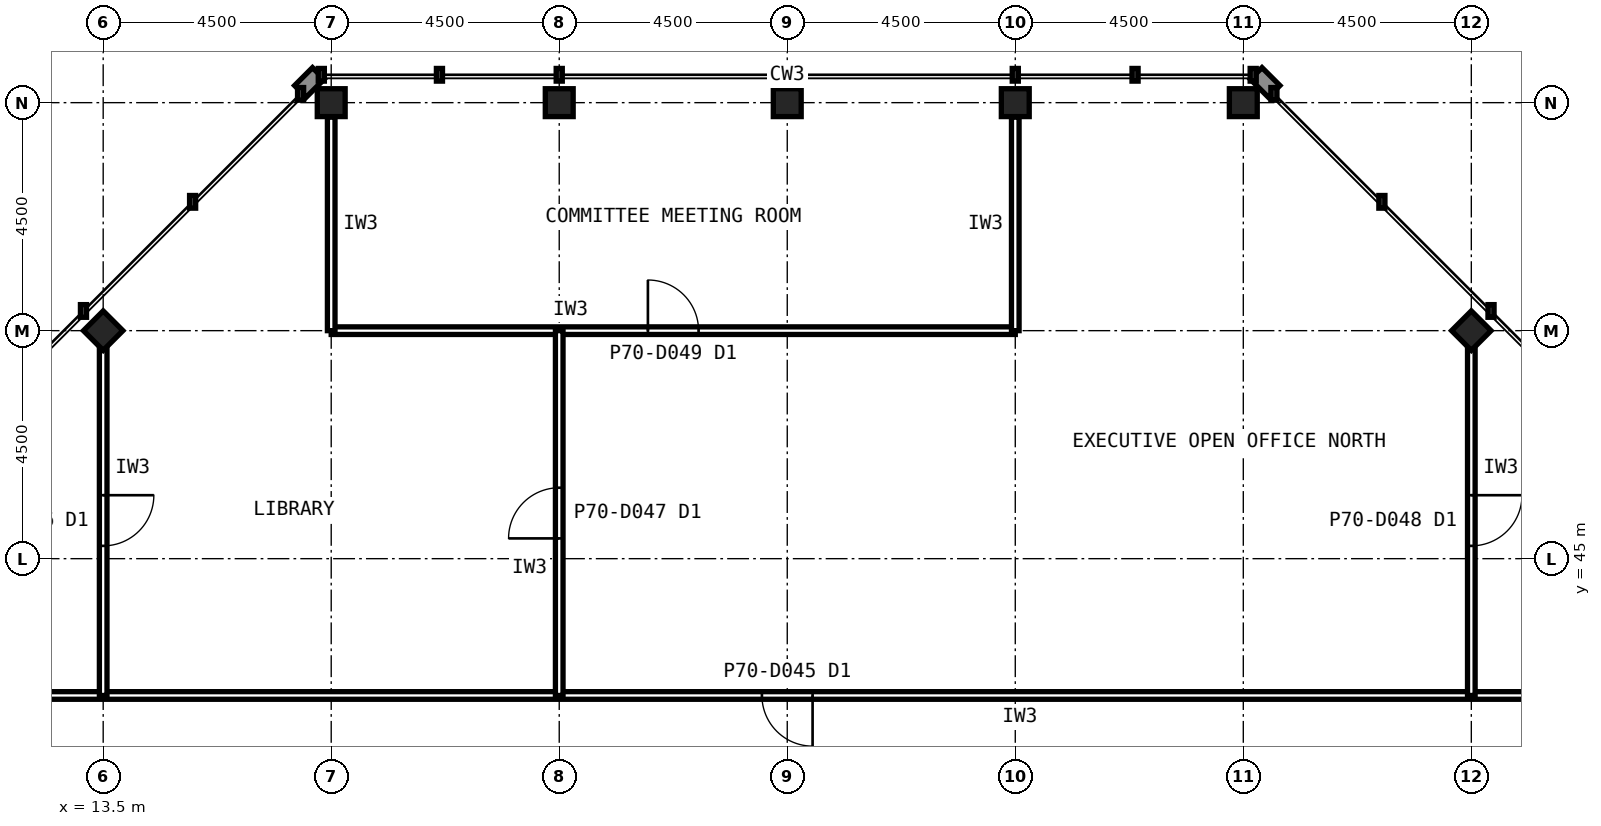
"""IFC4 building model, lengths in metres.
Left out: names, types, materials, properties, quantities, classifications, styles, units other than length and angle.
Written with IfcOpenShell. Run it as: python <this file> out.ifc"""

import sys

from ifc_helpers import new_model, si_unit, direction, frame, frame_2d, origin, origin_2d, place, context, subcontext, project, spatial, rectangle, hollow_rectangle, extrude, element, fill, save


model = new_model("IFC4")
c1 = context("Model", 3, precision=1e-05, world=origin(), true_north=direction((0.0, 1.0)))
c2 = subcontext(c1, "Body", "Model", "MODEL_VIEW")
j1 = project(units=[si_unit("LENGTHUNIT", "METRE"), si_unit("PLANEANGLEUNIT", "RADIAN")], contexts=[c1])
p1 = place(None, origin())
s1 = spatial("IfcSite", under=j1, at=p1, CompositionType="ELEMENT")
p2 = place(p1, origin())
s2 = spatial("IfcBuilding", under=s1, at=p2, CompositionType="ELEMENT")
p3 = place(p2, frame((0.0, 0.0, 294.6)))
s3 = spatial("IfcBuildingStorey", under=s2, at=p3, CompositionType="ELEMENT", Elevation=294.6)
for number, where, z_axis, x_axis in (
    (1, (36.0, 54.0, 0.0), (0.0, 0.0, 1.0), (1.0, 0.0, 0.0)),
    (2, (31.5, 54.0, 0.0), (0.0, 0.0, 1.0), (1.0, 0.0, 0.0)),
    (3, (27.0, 54.0, 0.0), (0.0, 0.0, 1.0), (1.0, 0.0, 0.0)),
    (4, (22.5, 54.0, 0.0), (0.0, 0.0, 1.0), (1.0, 0.0, 0.0)),
    (5, (18.0, 54.0, 0.0), (0.0, 0.0, 1.0), (1.0, 0.0, 0.0)),
    (6, (40.5, 49.5, 0.0), (0.0, 0.0, 1.0), (0.707, 0.707, 0.0)),
    (7, (13.5, 49.5, 0.0), (0.0, 0.0, 1.0), (0.707, 0.707, 0.0)),
):
    element("IfcColumn", number, at=place(p3, frame(where, z_axis=z_axis, x_axis=x_axis)), inside=s3, PredefinedType="COLUMN", context=c2, shape_type="SweptSolid", body=[
        extrude(hollow_rectangle(XDim=0.55, YDim=0.55, WallThickness=0.025, at=origin_2d()), origin(), (0.0, 0.0, 1.0), 4.0),
    ])
p4 = place(p3, frame((42.3, 42.3, 0.0), z_axis=(0.0, 0.0, 1.0), x_axis=(-1.0, 0.0, 0.0)))
e8 = element("IfcWall", 8, at=p4, inside=s3, PredefinedType="PARTITIONING", context=c2, shape_type="SweptSolid", body=[
    extrude(rectangle(XDim=30.6, YDim=0.15, at=frame_2d((15.3, 0.0))), origin(), (0.0, 0.0, 1.0), 3.84),
])
p5 = place(p4, frame((14.8, 0.0, 0.0)))
e9 = element("IfcOpeningElement", 9, at=p5, cuts=e8, PredefinedType="OPENING", context=c2, shape_type="SweptSolid", body=[
    extrude(rectangle(XDim=1.0, YDim=2.1, at=frame_2d((0.5, 1.05))), frame((0.0, 0.085, 0.0), z_axis=(0.0, -1.0, 0.0), x_axis=(1.0, 0.0, 0.0)), (0.0, 0.0, 1.0), 0.17),
])
p6 = place(p3, frame((18.0, 49.5, 0.0), z_axis=(0.0, 0.0, 1.0), x_axis=(1.0, 0.0, 0.0)))
e10 = element("IfcWall", 10, at=p6, inside=s3, PredefinedType="PARTITIONING", context=c2, shape_type="SweptSolid", body=[
    extrude(rectangle(XDim=13.5, YDim=0.15, at=frame_2d((6.75, 0.0))), origin(), (0.0, 0.0, 1.0), 3.84),
])
p7 = place(p6, frame((6.25, 0.0, 0.0)))
e11 = element("IfcOpeningElement", 11, at=p7, cuts=e10, PredefinedType="OPENING", context=c2, shape_type="SweptSolid", body=[
    extrude(rectangle(XDim=1.0, YDim=2.1, at=frame_2d((0.5, 1.05))), frame((0.0, 0.085, 0.0), z_axis=(0.0, -1.0, 0.0), x_axis=(1.0, 0.0, 0.0)), (0.0, 0.0, 1.0), 0.17),
])
for number, where, z_axis, x_axis in (
    (12, (31.5, 49.5, 0.0), (0.0, 0.0, 1.0), (0.0, 1.0, 0.0)),
    (13, (18.0, 53.715, 0.0), (0.0, 0.0, 1.0), (0.0, -1.0, 0.0)),
):
    element("IfcWall", number, at=place(p3, frame(where, z_axis=z_axis, x_axis=x_axis)), inside=s3, PredefinedType="PARTITIONING", context=c2, shape_type="SweptSolid", body=[
        extrude(rectangle(XDim=4.215, YDim=0.15, at=frame_2d((2.107, 0.0))), origin(), (0.0, 0.0, 1.0), 2.989),
    ])
p8 = place(p3, frame((22.5, 42.3, 0.0), z_axis=(0.0, 0.0, 1.0), x_axis=(0.0, 1.0, 0.0)))
e14 = element("IfcWall", 14, at=p8, inside=s3, PredefinedType="PARTITIONING", context=c2, shape_type="SweptSolid", body=[
    extrude(rectangle(XDim=7.2, YDim=0.15, at=frame_2d((3.6, 0.0))), origin(), (0.0, 0.0, 1.0), 2.989),
])
p9 = place(p8, frame((3.1, 0.0, 0.0)))
e15 = element("IfcOpeningElement", 15, at=p9, cuts=e14, PredefinedType="OPENING", context=c2, shape_type="SweptSolid", body=[
    extrude(rectangle(XDim=1.0, YDim=2.1, at=frame_2d((0.5, 1.05))), frame((0.0, 0.085, 0.0), z_axis=(0.0, -1.0, 0.0), x_axis=(1.0, 0.0, 0.0)), (0.0, 0.0, 1.0), 0.17),
])
p10 = place(p3, frame((40.5, 49.205, 0.0), z_axis=(0.0, 0.0, 1.0), x_axis=(0.0, -1.0, 0.0)))
e16 = element("IfcWall", 16, at=p10, inside=s3, PredefinedType="PARTITIONING", context=c2, shape_type="SweptSolid", body=[
    extrude(rectangle(XDim=6.905, YDim=0.15, at=frame_2d((3.453, 0.0))), origin(), (0.0, 0.0, 1.0), 2.989),
])
p11 = place(p10, frame((2.952, 0.0, 0.0)))
e17 = element("IfcOpeningElement", 17, at=p11, cuts=e16, PredefinedType="OPENING", context=c2, shape_type="SweptSolid", body=[
    extrude(rectangle(XDim=1.0, YDim=2.1, at=frame_2d((0.5, 1.05))), frame((0.0, 0.085, 0.0), z_axis=(0.0, -1.0, 0.0), x_axis=(1.0, 0.0, 0.0)), (0.0, 0.0, 1.0), 0.17),
])
p12 = place(p3, frame((13.5, 49.205, 0.0), z_axis=(0.0, 0.0, 1.0), x_axis=(0.0, -1.0, 0.0)))
e18 = element("IfcWall", 18, at=p12, inside=s3, PredefinedType="PARTITIONING", context=c2, shape_type="SweptSolid", body=[
    extrude(rectangle(XDim=6.905, YDim=0.15, at=frame_2d((3.453, 0.0))), origin(), (0.0, 0.0, 1.0), 2.989),
])
p13 = place(p12, frame((2.952, 0.0, 0.0)))
e19 = element("IfcOpeningElement", 19, at=p13, cuts=e18, PredefinedType="OPENING", context=c2, shape_type="SweptSolid", body=[
    extrude(rectangle(XDim=1.0, YDim=2.1, at=frame_2d((0.5, 1.05))), frame((0.0, 0.085, 0.0), z_axis=(0.0, -1.0, 0.0), x_axis=(1.0, 0.0, 0.0)), (0.0, 0.0, 1.0), 0.17),
])
p14 = place(p5, origin())
e20 = element("IfcDoor", 20, at=p14, inside=s3, OperationType="SINGLE_SWING_LEFT", PredefinedType="DOOR", context=c2, shape_type="SweptSolid", body=[
    extrude(rectangle(XDim=1.0, YDim=2.1, at=frame_2d((0.5, 1.05))), frame((0.0, 0.025, 0.0), z_axis=(0.0, -1.0, 0.0), x_axis=(1.0, 0.0, 0.0)), (0.0, 0.0, 1.0), 0.05),
])
fill(e9, e20)
p15 = place(p7, origin())
e21 = element("IfcDoor", 21, at=p15, inside=s3, OperationType="SINGLE_SWING_LEFT", PredefinedType="DOOR", context=c2, shape_type="SweptSolid", body=[
    extrude(rectangle(XDim=1.0, YDim=2.1, at=frame_2d((0.5, 1.05))), frame((0.0, 0.025, 0.0), z_axis=(0.0, -1.0, 0.0), x_axis=(1.0, 0.0, 0.0)), (0.0, 0.0, 1.0), 0.05),
])
fill(e11, e21)
p16 = place(p9, origin())
e22 = element("IfcDoor", 22, at=p16, inside=s3, OperationType="SINGLE_SWING_LEFT", PredefinedType="DOOR", context=c2, shape_type="SweptSolid", body=[
    extrude(rectangle(XDim=1.0, YDim=2.1, at=frame_2d((0.5, 1.05))), frame((0.0, 0.025, 0.0), z_axis=(0.0, -1.0, 0.0), x_axis=(1.0, 0.0, 0.0)), (0.0, 0.0, 1.0), 0.05),
])
fill(e15, e22)
p17 = place(p11, origin())
e23 = element("IfcDoor", 23, at=p17, inside=s3, OperationType="SINGLE_SWING_LEFT", PredefinedType="DOOR", context=c2, shape_type="SweptSolid", body=[
    extrude(rectangle(XDim=1.0, YDim=2.1, at=frame_2d((0.5, 1.05))), frame((0.0, 0.025, 0.0), z_axis=(0.0, -1.0, 0.0), x_axis=(1.0, 0.0, 0.0)), (0.0, 0.0, 1.0), 0.05),
])
fill(e17, e23)
p18 = place(p13, origin())
e24 = element("IfcDoor", 24, at=p18, inside=s3, OperationType="SINGLE_SWING_LEFT", PredefinedType="DOOR", context=c2, shape_type="SweptSolid", body=[
    extrude(rectangle(XDim=1.0, YDim=2.1, at=frame_2d((0.5, 1.05))), frame((0.0, 0.025, 0.0), z_axis=(0.0, -1.0, 0.0), x_axis=(1.0, 0.0, 0.0)), (0.0, 0.0, 1.0), 0.05),
])
fill(e19, e24)
save(model, sys.argv[1])
